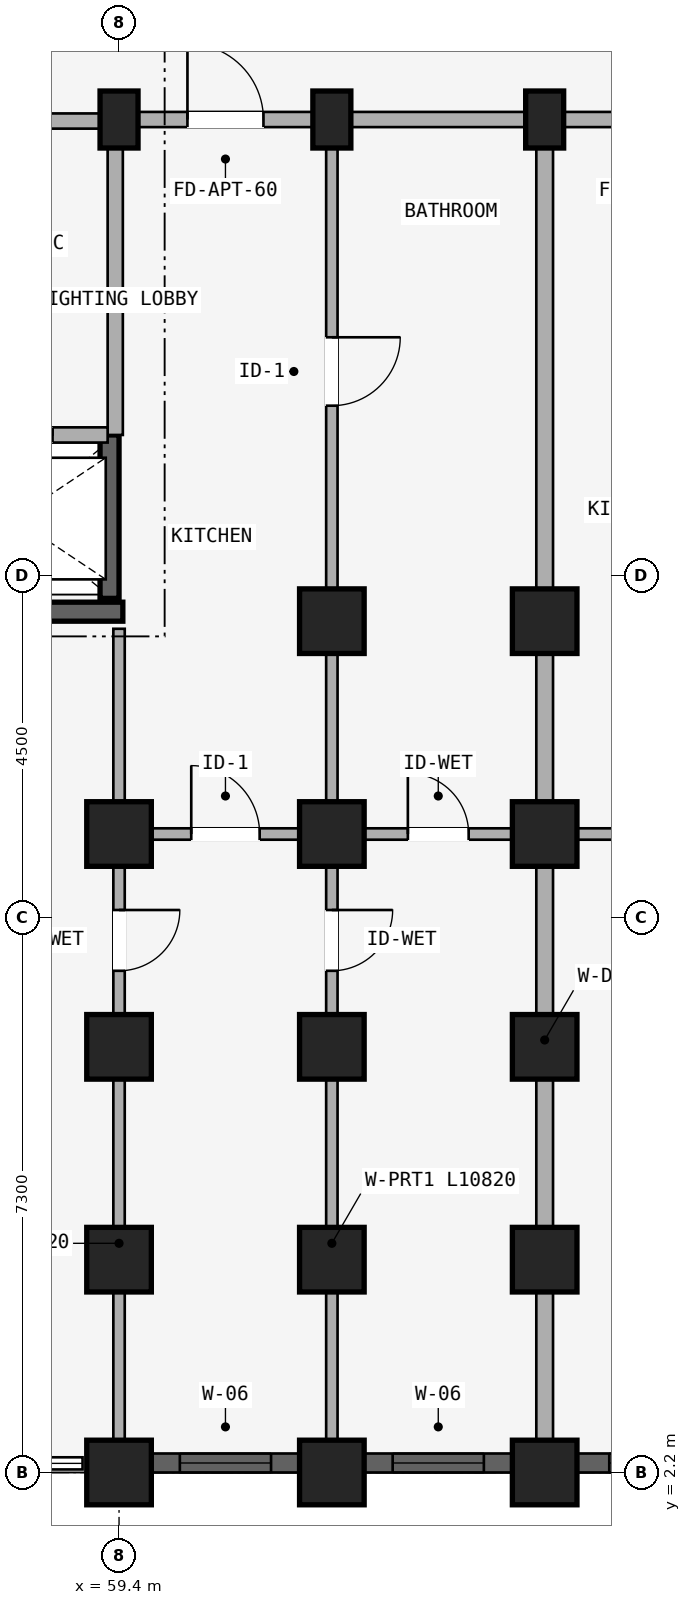
"""IFC4 building model, lengths in metres.
Left out: names, types, materials, properties, quantities, classifications, styles, units other than length and angle.
Written with IfcOpenShell. Run it as: python <this file> out.ifc"""

import sys

from ifc_helpers import new_model, si_unit, direction, frame, frame_2d, origin, origin_2d, place, context, subcontext, project, spatial, rectangle, extrude, element, fill, save


model = new_model("IFC4")
c1 = context("Model", 3, precision=1e-05, world=origin(), true_north=direction((0.0, 1.0)))
c2 = subcontext(c1, "Body", "Model", "MODEL_VIEW")
j1 = project(units=[si_unit("LENGTHUNIT", "METRE"), si_unit("PLANEANGLEUNIT", "RADIAN")], contexts=[c1])
p1 = place(None, origin())
s1 = spatial("IfcSite", under=j1, at=p1, CompositionType="ELEMENT")
p2 = place(p1, origin())
s2 = spatial("IfcBuilding", under=s1, at=p2, CompositionType="ELEMENT")
p3 = place(p2, frame((0.0, 0.0, 4.5)))
s3 = spatial("IfcBuildingStorey", under=s2, at=p3, CompositionType="ELEMENT", Elevation=4.5)
p4 = place(p3, frame((56.65, 13.525, 0.0), z_axis=(0.0, 0.0, 1.0), x_axis=(1.0, 0.0, 0.0)))
e1 = element("IfcWall", 1, at=p4, inside=s3, PredefinedType="SHEAR", context=c2, shape_type="SweptSolid", body=[
    extrude(rectangle(XDim=2.8, YDim=0.25, at=frame_2d((1.4, 0.0))), origin(), (0.0, 0.0, 1.0), 3.98),
])
p5 = place(p3, frame((59.275, 15.85, 0.0), z_axis=(0.0, 0.0, 1.0), x_axis=(0.0, -1.0, 0.0)))
e2 = element("IfcWall", 2, at=p5, inside=s3, PredefinedType="SHEAR", context=c2, shape_type="SweptSolid", body=[
    extrude(rectangle(XDim=2.15, YDim=0.25, at=frame_2d((1.075, 0.0))), origin(), (0.0, 0.0, 1.0), 3.98),
])
p6 = place(p3, frame((59.4, 20.0, 0.0), z_axis=(0.0, 0.0, 1.0), x_axis=(1.0, 0.0, 0.0)))
e3 = element("IfcColumn", 3, at=p6, inside=s3, PredefinedType="COLUMN", context=c2, shape_type="SweptSolid", body=[
    extrude(rectangle(XDim=0.5, YDim=0.75, at=origin_2d()), origin(), (0.0, 0.0, 1.0), 3.98),
])
for number, where, z_axis, x_axis in (
    (4, (59.4, 10.6, 0.0), (0.0, 0.0, 1.0), (1.0, 0.0, 0.0)),
    (5, (59.4, 7.8, 0.0), (0.0, 0.0, 1.0), (1.0, 0.0, 0.0)),
    (6, (59.4, 5.0, 0.0), (0.0, 0.0, 1.0), (1.0, 0.0, 0.0)),
    (7, (59.4, 2.2, 0.0), (0.0, 0.0, 1.0), (1.0, 0.0, 0.0)),
):
    element("IfcColumn", number, at=place(p3, frame(where, z_axis=z_axis, x_axis=x_axis)), inside=s3, PredefinedType="COLUMN", context=c2, shape_type="SweptSolid", body=[
        extrude(rectangle(XDim=0.85, YDim=0.85, at=origin_2d()), origin(), (0.0, 0.0, 1.0), 3.98),
    ])
p7 = place(p3, frame((62.2, 20.0, 0.0), z_axis=(0.0, 0.0, 1.0), x_axis=(1.0, 0.0, 0.0)))
e8 = element("IfcColumn", 8, at=p7, inside=s3, PredefinedType="COLUMN", context=c2, shape_type="SweptSolid", body=[
    extrude(rectangle(XDim=0.5, YDim=0.75, at=origin_2d()), origin(), (0.0, 0.0, 1.0), 3.98),
])
for number, where, z_axis, x_axis in (
    (9, (62.2, 13.4, 0.0), (0.0, 0.0, 1.0), (1.0, 0.0, 0.0)),
    (10, (62.2, 10.6, 0.0), (0.0, 0.0, 1.0), (1.0, 0.0, 0.0)),
    (11, (62.2, 7.8, 0.0), (0.0, 0.0, 1.0), (1.0, 0.0, 0.0)),
    (12, (62.2, 5.0, 0.0), (0.0, 0.0, 1.0), (1.0, 0.0, 0.0)),
    (13, (62.2, 2.2, 0.0), (0.0, 0.0, 1.0), (1.0, 0.0, 0.0)),
):
    element("IfcColumn", number, at=place(p3, frame(where, z_axis=z_axis, x_axis=x_axis)), inside=s3, PredefinedType="COLUMN", context=c2, shape_type="SweptSolid", body=[
        extrude(rectangle(XDim=0.85, YDim=0.85, at=origin_2d()), origin(), (0.0, 0.0, 1.0), 3.98),
    ])
p8 = place(p3, frame((65.0, 20.0, 0.0), z_axis=(0.0, 0.0, 1.0), x_axis=(1.0, 0.0, 0.0)))
e14 = element("IfcColumn", 14, at=p8, inside=s3, PredefinedType="COLUMN", context=c2, shape_type="SweptSolid", body=[
    extrude(rectangle(XDim=0.5, YDim=0.75, at=origin_2d()), origin(), (0.0, 0.0, 1.0), 3.98),
])
for number, where, z_axis, x_axis in (
    (15, (65.0, 13.4, 0.0), (0.0, 0.0, 1.0), (1.0, 0.0, 0.0)),
    (16, (65.0, 10.6, 0.0), (0.0, 0.0, 1.0), (1.0, 0.0, 0.0)),
    (17, (65.0, 7.8, 0.0), (0.0, 0.0, 1.0), (1.0, 0.0, 0.0)),
    (18, (65.0, 5.0, 0.0), (0.0, 0.0, 1.0), (1.0, 0.0, 0.0)),
    (19, (65.0, 2.2, 0.0), (0.0, 0.0, 1.0), (1.0, 0.0, 0.0)),
):
    element("IfcColumn", number, at=place(p3, frame(where, z_axis=z_axis, x_axis=x_axis)), inside=s3, PredefinedType="COLUMN", context=c2, shape_type="SweptSolid", body=[
        extrude(rectangle(XDim=0.85, YDim=0.85, at=origin_2d()), origin(), (0.0, 0.0, 1.0), 3.98),
    ])
p9 = place(p3, frame((53.7, 19.98, 0.0), z_axis=(0.0, 0.0, 1.0), x_axis=(1.0, 0.0, 0.0)))
e20 = element("IfcWall", 20, at=p9, inside=s3, PredefinedType="STANDARD", context=c2, shape_type="SweptSolid", body=[
    extrude(rectangle(XDim=5.65, YDim=0.2, at=frame_2d((2.825, 0.0))), origin(), (0.0, 0.0, 1.0), 3.322),
])
p10 = place(p9, frame((1.923, 0.0, 0.0)))
e21 = element("IfcOpeningElement", 21, at=p10, cuts=e20, PredefinedType="OPENING", context=c2, shape_type="SweptSolid", body=[
    extrude(rectangle(XDim=1.24, YDim=2.15, at=frame_2d((0.62, 1.075))), frame((0.0, 0.11, 0.0), z_axis=(0.0, -1.0, 0.0), x_axis=(1.0, 0.0, 0.0)), (0.0, 0.0, 1.0), 0.22),
])
p11 = place(p3, frame((59.35, 19.98, 0.0), z_axis=(0.0, 0.0, 1.0), x_axis=(0.0, -1.0, 0.0)))
e22 = element("IfcWall", 22, at=p11, inside=s3, PredefinedType="STANDARD", context=c2, shape_type="SweptSolid", body=[
    extrude(rectangle(XDim=4.13, YDim=0.2, at=frame_2d((2.065, 0.0))), origin(), (0.0, 0.0, 1.0), 3.322),
])
p12 = place(p3, frame((56.7, 15.85, 0.0), z_axis=(0.0, 0.0, 1.0), x_axis=(1.0, 0.0, 0.0)))
e23 = element("IfcWall", 23, at=p12, inside=s3, PredefinedType="STANDARD", context=c2, shape_type="SweptSolid", body=[
    extrude(rectangle(XDim=2.55, YDim=0.2, at=frame_2d((1.275, 0.0))), origin(), (0.0, 0.0, 1.0), 3.322),
])
p13 = place(p12, frame((0.725, 0.0, 0.0)))
e24 = element("IfcOpeningElement", 24, at=p13, cuts=e23, PredefinedType="OPENING", context=c2, shape_type="SweptSolid", body=[
    extrude(rectangle(XDim=1.1, YDim=2.15, at=frame_2d((0.55, 1.075))), frame((0.0, 0.11, 0.0), z_axis=(0.0, -1.0, 0.0), x_axis=(1.0, 0.0, 0.0)), (0.0, 0.0, 1.0), 0.22),
])
p14 = place(p3, frame((59.4, 20.0, 0.0), z_axis=(0.0, 0.0, 1.0), x_axis=(1.0, 0.0, 0.0)))
e25 = element("IfcWall", 25, at=p14, inside=s3, PredefinedType="STANDARD", context=c2, shape_type="SweptSolid", body=[
    extrude(rectangle(XDim=2.8, YDim=0.2, at=frame_2d((1.4, 0.0))), origin(), (0.0, 0.0, 1.0), 3.322),
])
p15 = place(p14, frame((0.9, 0.0, 0.0)))
e26 = element("IfcOpeningElement", 26, at=p15, cuts=e25, PredefinedType="OPENING", context=c2, shape_type="SweptSolid", body=[
    extrude(rectangle(XDim=1.0, YDim=2.15, at=frame_2d((0.5, 1.075))), frame((0.0, 0.11, 0.0), z_axis=(0.0, -1.0, 0.0), x_axis=(1.0, 0.0, 0.0)), (0.0, 0.0, 1.0), 0.22),
])
p16 = place(p3, frame((59.48, 10.6, 0.0), z_axis=(0.0, 0.0, 1.0), x_axis=(1.0, 0.0, 0.0)))
e27 = element("IfcWall", 27, at=p16, inside=s3, PredefinedType="PLUMBINGWALL", context=c2, shape_type="SweptSolid", body=[
    extrude(rectangle(XDim=2.64, YDim=0.15, at=frame_2d((1.32, 0.0))), origin(), (0.0, 0.0, 1.0), 3.322),
])
p17 = place(p16, frame((0.87, 0.0, 0.0)))
e28 = element("IfcOpeningElement", 28, at=p17, cuts=e27, PredefinedType="OPENING", context=c2, shape_type="SweptSolid", body=[
    extrude(rectangle(XDim=0.9, YDim=2.1, at=frame_2d((0.45, 1.05))), frame((0.0, 0.085, 0.0), z_axis=(0.0, -1.0, 0.0), x_axis=(1.0, 0.0, 0.0)), (0.0, 0.0, 1.0), 0.17),
])
p18 = place(p3, frame((62.2, 20.0, 0.0), z_axis=(0.0, 0.0, 1.0), x_axis=(1.0, 0.0, 0.0)))
e29 = element("IfcWall", 29, at=p18, inside=s3, PredefinedType="STANDARD", context=c2, shape_type="SweptSolid", body=[
    extrude(rectangle(XDim=2.8, YDim=0.2, at=frame_2d((1.4, 0.0))), origin(), (0.0, 0.0, 1.0), 3.322),
])
p19 = place(p3, frame((62.28, 10.6, 0.0), z_axis=(0.0, 0.0, 1.0), x_axis=(1.0, 0.0, 0.0)))
e30 = element("IfcWall", 30, at=p19, inside=s3, PredefinedType="PLUMBINGWALL", context=c2, shape_type="SweptSolid", body=[
    extrude(rectangle(XDim=2.64, YDim=0.15, at=frame_2d((1.32, 0.0))), origin(), (0.0, 0.0, 1.0), 3.322),
])
p20 = place(p19, frame((0.92, 0.0, 0.0)))
e31 = element("IfcOpeningElement", 31, at=p20, cuts=e30, PredefinedType="OPENING", context=c2, shape_type="SweptSolid", body=[
    extrude(rectangle(XDim=0.8, YDim=2.1, at=frame_2d((0.4, 1.05))), frame((0.0, 0.085, 0.0), z_axis=(0.0, -1.0, 0.0), x_axis=(1.0, 0.0, 0.0)), (0.0, 0.0, 1.0), 0.17),
])
p21 = place(p3, frame((65.0, 20.0, 0.0), z_axis=(0.0, 0.0, 1.0), x_axis=(1.0, 0.0, 0.0)))
e32 = element("IfcWall", 32, at=p21, inside=s3, PredefinedType="STANDARD", context=c2, shape_type="SweptSolid", body=[
    extrude(rectangle(XDim=2.8, YDim=0.2, at=frame_2d((1.4, 0.0))), origin(), (0.0, 0.0, 1.0), 3.322),
])
p22 = place(p21, frame((0.9, 0.0, 0.0)))
e33 = element("IfcOpeningElement", 33, at=p22, cuts=e32, PredefinedType="OPENING", context=c2, shape_type="SweptSolid", body=[
    extrude(rectangle(XDim=1.0, YDim=2.15, at=frame_2d((0.5, 1.075))), frame((0.0, 0.11, 0.0), z_axis=(0.0, -1.0, 0.0), x_axis=(1.0, 0.0, 0.0)), (0.0, 0.0, 1.0), 0.22),
])
p23 = place(p3, frame((65.08, 10.6, 0.0), z_axis=(0.0, 0.0, 1.0), x_axis=(1.0, 0.0, 0.0)))
e34 = element("IfcWall", 34, at=p23, inside=s3, PredefinedType="PLUMBINGWALL", context=c2, shape_type="SweptSolid", body=[
    extrude(rectangle(XDim=2.64, YDim=0.15, at=frame_2d((1.32, 0.0))), origin(), (0.0, 0.0, 1.0), 3.322),
])
p24 = place(p23, frame((0.87, 0.0, 0.0)))
e35 = element("IfcOpeningElement", 35, at=p24, cuts=e34, PredefinedType="OPENING", context=c2, shape_type="SweptSolid", body=[
    extrude(rectangle(XDim=0.9, YDim=2.1, at=frame_2d((0.45, 1.05))), frame((0.0, 0.085, 0.0), z_axis=(0.0, -1.0, 0.0), x_axis=(1.0, 0.0, 0.0)), (0.0, 0.0, 1.0), 0.17),
])
p25 = place(p3, frame((59.4, 13.3, 0.0), z_axis=(0.0, 0.0, 1.0), x_axis=(0.0, -1.0, 0.0)))
e36 = element("IfcWall", 36, at=p25, inside=s3, PredefinedType="PARTITIONING", context=c2, shape_type="SweptSolid", body=[
    extrude(rectangle(XDim=10.82, YDim=0.15, at=frame_2d((5.41, 0.0))), origin(), (0.0, 0.0, 1.0), 3.322),
])
p26 = place(p25, frame((3.7, 0.0, 0.0)))
e37 = element("IfcOpeningElement", 37, at=p26, cuts=e36, PredefinedType="OPENING", context=c2, shape_type="SweptSolid", body=[
    extrude(rectangle(XDim=0.8, YDim=2.1, at=frame_2d((0.4, 1.05))), frame((0.0, 0.085, 0.0), z_axis=(0.0, -1.0, 0.0), x_axis=(1.0, 0.0, 0.0)), (0.0, 0.0, 1.0), 0.17),
])
p27 = place(p3, frame((62.2, 19.95, 0.0), z_axis=(0.0, 0.0, 1.0), x_axis=(0.0, -1.0, 0.0)))
e38 = element("IfcWall", 38, at=p27, inside=s3, PredefinedType="PARTITIONING", context=c2, shape_type="SweptSolid", body=[
    extrude(rectangle(XDim=6.53, YDim=0.15, at=frame_2d((3.265, 0.0))), origin(), (0.0, 0.0, 1.0), 3.322),
])
p28 = place(p27, frame((2.815, 0.0, 0.0)))
e39 = element("IfcOpeningElement", 39, at=p28, cuts=e38, PredefinedType="OPENING", context=c2, shape_type="SweptSolid", body=[
    extrude(rectangle(XDim=0.9, YDim=2.1, at=frame_2d((0.45, 1.05))), frame((0.0, 0.085, 0.0), z_axis=(0.0, -1.0, 0.0), x_axis=(1.0, 0.0, 0.0)), (0.0, 0.0, 1.0), 0.17),
])
p29 = place(p3, frame((62.2, 13.3, 0.0), z_axis=(0.0, 0.0, 1.0), x_axis=(0.0, -1.0, 0.0)))
e40 = element("IfcWall", 40, at=p29, inside=s3, PredefinedType="PARTITIONING", context=c2, shape_type="SweptSolid", body=[
    extrude(rectangle(XDim=10.82, YDim=0.15, at=frame_2d((5.41, 0.0))), origin(), (0.0, 0.0, 1.0), 3.322),
])
p30 = place(p29, frame((3.7, 0.0, 0.0)))
e41 = element("IfcOpeningElement", 41, at=p30, cuts=e40, PredefinedType="OPENING", context=c2, shape_type="SweptSolid", body=[
    extrude(rectangle(XDim=0.8, YDim=2.1, at=frame_2d((0.4, 1.05))), frame((0.0, 0.085, 0.0), z_axis=(0.0, -1.0, 0.0), x_axis=(1.0, 0.0, 0.0)), (0.0, 0.0, 1.0), 0.17),
])
p31 = place(p3, frame((65.0, 19.95, 0.0), z_axis=(0.0, 0.0, 1.0), x_axis=(0.0, -1.0, 0.0)))
e42 = element("IfcWall", 42, at=p31, inside=s3, PredefinedType="STANDARD", context=c2, shape_type="SweptSolid", body=[
    extrude(rectangle(XDim=6.53, YDim=0.22, at=frame_2d((3.265, 0.0))), origin(), (0.0, 0.0, 1.0), 3.322),
])
p32 = place(p3, frame((65.0, 13.3, 0.0), z_axis=(0.0, 0.0, 1.0), x_axis=(0.0, -1.0, 0.0)))
e43 = element("IfcWall", 43, at=p32, inside=s3, PredefinedType="STANDARD", context=c2, shape_type="SweptSolid", body=[
    extrude(rectangle(XDim=10.82, YDim=0.22, at=frame_2d((5.41, 0.0))), origin(), (0.0, 0.0, 1.0), 3.322),
])
p33 = place(p3, frame((59.829, 2.325, 0.0), z_axis=(0.0, 0.0, 1.0), x_axis=(1.0, 0.0, 0.0)))
e44 = element("IfcWall", 44, at=p33, inside=s3, PredefinedType="STANDARD", context=c2, shape_type="SweptSolid", body=[
    extrude(rectangle(XDim=1.943, YDim=0.25, at=frame_2d((0.971, 0.0))), origin(), (0.0, 0.0, 1.0), 3.522),
])
p34 = place(p33, frame((0.372, 0.0, 0.88)))
e45 = element("IfcOpeningElement", 45, at=p34, cuts=e44, PredefinedType="OPENING", context=c2, shape_type="SweptSolid", body=[
    extrude(rectangle(XDim=1.2, YDim=1.5, at=frame_2d((0.6, 0.75))), frame((0.0, 0.135, 0.0), z_axis=(0.0, -1.0, 0.0), x_axis=(1.0, 0.0, 0.0)), (0.0, 0.0, 1.0), 0.27),
])
p35 = place(p3, frame((62.628, 2.325, 0.0), z_axis=(0.0, 0.0, 1.0), x_axis=(1.0, 0.0, 0.0)))
e46 = element("IfcWall", 46, at=p35, inside=s3, PredefinedType="STANDARD", context=c2, shape_type="SweptSolid", body=[
    extrude(rectangle(XDim=1.943, YDim=0.25, at=frame_2d((0.972, 0.0))), origin(), (0.0, 0.0, 1.0), 3.522),
])
p36 = place(p35, frame((0.372, 0.0, 0.88)))
e47 = element("IfcOpeningElement", 47, at=p36, cuts=e46, PredefinedType="OPENING", context=c2, shape_type="SweptSolid", body=[
    extrude(rectangle(XDim=1.2, YDim=1.5, at=frame_2d((0.6, 0.75))), frame((0.0, 0.135, 0.0), z_axis=(0.0, -1.0, 0.0), x_axis=(1.0, 0.0, 0.0)), (0.0, 0.0, 1.0), 0.27),
])
p37 = place(p3, frame((65.428, 2.325, 0.0), z_axis=(0.0, 0.0, 1.0), x_axis=(1.0, 0.0, 0.0)))
e48 = element("IfcWall", 48, at=p37, inside=s3, PredefinedType="STANDARD", context=c2, shape_type="SweptSolid", body=[
    extrude(rectangle(XDim=1.943, YDim=0.25, at=frame_2d((0.972, 0.0))), origin(), (0.0, 0.0, 1.0), 3.522),
])
p38 = place(p37, frame((0.421, 0.0, 0.88)))
e49 = element("IfcOpeningElement", 49, at=p38, cuts=e48, PredefinedType="OPENING", context=c2, shape_type="SweptSolid", body=[
    extrude(rectangle(XDim=1.1, YDim=1.45, at=frame_2d((0.55, 0.725))), frame((0.0, 0.135, 0.0), z_axis=(0.0, -1.0, 0.0), x_axis=(1.0, 0.0, 0.0)), (0.0, 0.0, 1.0), 0.27),
])
p39 = place(p34, origin())
e50 = element("IfcWindow", 50, at=p39, inside=s3, PartitioningType="SINGLE_PANEL", PredefinedType="WINDOW", context=c2, shape_type="SweptSolid", body=[
    extrude(rectangle(XDim=1.2, YDim=1.5, at=frame_2d((0.6, 0.75))), frame((0.0, 0.03, 0.0), z_axis=(0.0, -1.0, 0.0), x_axis=(1.0, 0.0, 0.0)), (0.0, 0.0, 1.0), 0.06),
])
fill(e45, e50)
p40 = place(p36, origin())
e51 = element("IfcWindow", 51, at=p40, inside=s3, PartitioningType="SINGLE_PANEL", PredefinedType="WINDOW", context=c2, shape_type="SweptSolid", body=[
    extrude(rectangle(XDim=1.2, YDim=1.5, at=frame_2d((0.6, 0.75))), frame((0.0, 0.03, 0.0), z_axis=(0.0, -1.0, 0.0), x_axis=(1.0, 0.0, 0.0)), (0.0, 0.0, 1.0), 0.06),
])
fill(e47, e51)
p41 = place(p38, origin())
e52 = element("IfcWindow", 52, at=p41, inside=s3, PartitioningType="SINGLE_PANEL", PredefinedType="WINDOW", context=c2, shape_type="SweptSolid", body=[
    extrude(rectangle(XDim=1.1, YDim=1.45, at=frame_2d((0.55, 0.725))), frame((0.0, 0.03, 0.0), z_axis=(0.0, -1.0, 0.0), x_axis=(1.0, 0.0, 0.0)), (0.0, 0.0, 1.0), 0.06),
])
fill(e49, e52)
p42 = place(p13, origin())
e53 = element("IfcDoor", 53, at=p42, inside=s3, OperationType="SLIDING_TO_LEFT", PredefinedType="DOOR", context=c2, shape_type="SweptSolid", body=[
    extrude(rectangle(XDim=1.1, YDim=2.15, at=frame_2d((0.55, 1.075))), frame((0.0, 0.025, 0.0), z_axis=(0.0, -1.0, 0.0), x_axis=(1.0, 0.0, 0.0)), (0.0, 0.0, 1.0), 0.05),
])
fill(e24, e53)
p43 = place(p17, frame((0.9, 0.0, 0.0), z_axis=(0.0, 0.0, 1.0), x_axis=(-1.0, 0.0, 0.0)))
e54 = element("IfcDoor", 54, at=p43, inside=s3, OperationType="SINGLE_SWING_RIGHT", PredefinedType="DOOR", context=c2, shape_type="SweptSolid", body=[
    extrude(rectangle(XDim=0.9, YDim=2.1, at=frame_2d((0.45, 1.05))), frame((0.0, 0.025, 0.0), z_axis=(0.0, -1.0, 0.0), x_axis=(1.0, 0.0, 0.0)), (0.0, 0.0, 1.0), 0.05),
])
fill(e28, e54)
p44 = place(p15, origin())
e55 = element("IfcDoor", 55, at=p44, inside=s3, OperationType="SINGLE_SWING_LEFT", PredefinedType="DOOR", context=c2, shape_type="SweptSolid", body=[
    extrude(rectangle(XDim=1.0, YDim=2.15, at=frame_2d((0.5, 1.075))), frame((0.0, 0.025, 0.0), z_axis=(0.0, -1.0, 0.0), x_axis=(1.0, 0.0, 0.0)), (0.0, 0.0, 1.0), 0.05),
])
fill(e26, e55)
p45 = place(p20, frame((0.8, 0.0, 0.0), z_axis=(0.0, 0.0, 1.0), x_axis=(-1.0, 0.0, 0.0)))
e56 = element("IfcDoor", 56, at=p45, inside=s3, OperationType="SINGLE_SWING_RIGHT", PredefinedType="DOOR", context=c2, shape_type="SweptSolid", body=[
    extrude(rectangle(XDim=0.8, YDim=2.1, at=frame_2d((0.4, 1.05))), frame((0.0, 0.025, 0.0), z_axis=(0.0, -1.0, 0.0), x_axis=(1.0, 0.0, 0.0)), (0.0, 0.0, 1.0), 0.05),
])
fill(e31, e56)
p46 = place(p26, origin())
e57 = element("IfcDoor", 57, at=p46, inside=s3, OperationType="SINGLE_SWING_LEFT", PredefinedType="DOOR", context=c2, shape_type="SweptSolid", body=[
    extrude(rectangle(XDim=0.8, YDim=2.1, at=frame_2d((0.4, 1.05))), frame((0.0, 0.025, 0.0), z_axis=(0.0, -1.0, 0.0), x_axis=(1.0, 0.0, 0.0)), (0.0, 0.0, 1.0), 0.05),
])
fill(e37, e57)
p47 = place(p28, origin())
e58 = element("IfcDoor", 58, at=p47, inside=s3, OperationType="SINGLE_SWING_LEFT", PredefinedType="DOOR", context=c2, shape_type="SweptSolid", body=[
    extrude(rectangle(XDim=0.9, YDim=2.1, at=frame_2d((0.45, 1.05))), frame((0.0, 0.025, 0.0), z_axis=(0.0, -1.0, 0.0), x_axis=(1.0, 0.0, 0.0)), (0.0, 0.0, 1.0), 0.05),
])
fill(e39, e58)
p48 = place(p30, frame((0.8, 0.0, 0.0), z_axis=(0.0, 0.0, 1.0), x_axis=(-1.0, 0.0, 0.0)))
e59 = element("IfcDoor", 59, at=p48, inside=s3, OperationType="SINGLE_SWING_RIGHT", PredefinedType="DOOR", context=c2, shape_type="SweptSolid", body=[
    extrude(rectangle(XDim=0.8, YDim=2.1, at=frame_2d((0.4, 1.05))), frame((0.0, 0.025, 0.0), z_axis=(0.0, -1.0, 0.0), x_axis=(1.0, 0.0, 0.0)), (0.0, 0.0, 1.0), 0.05),
])
fill(e41, e59)
save(model, sys.argv[1])
